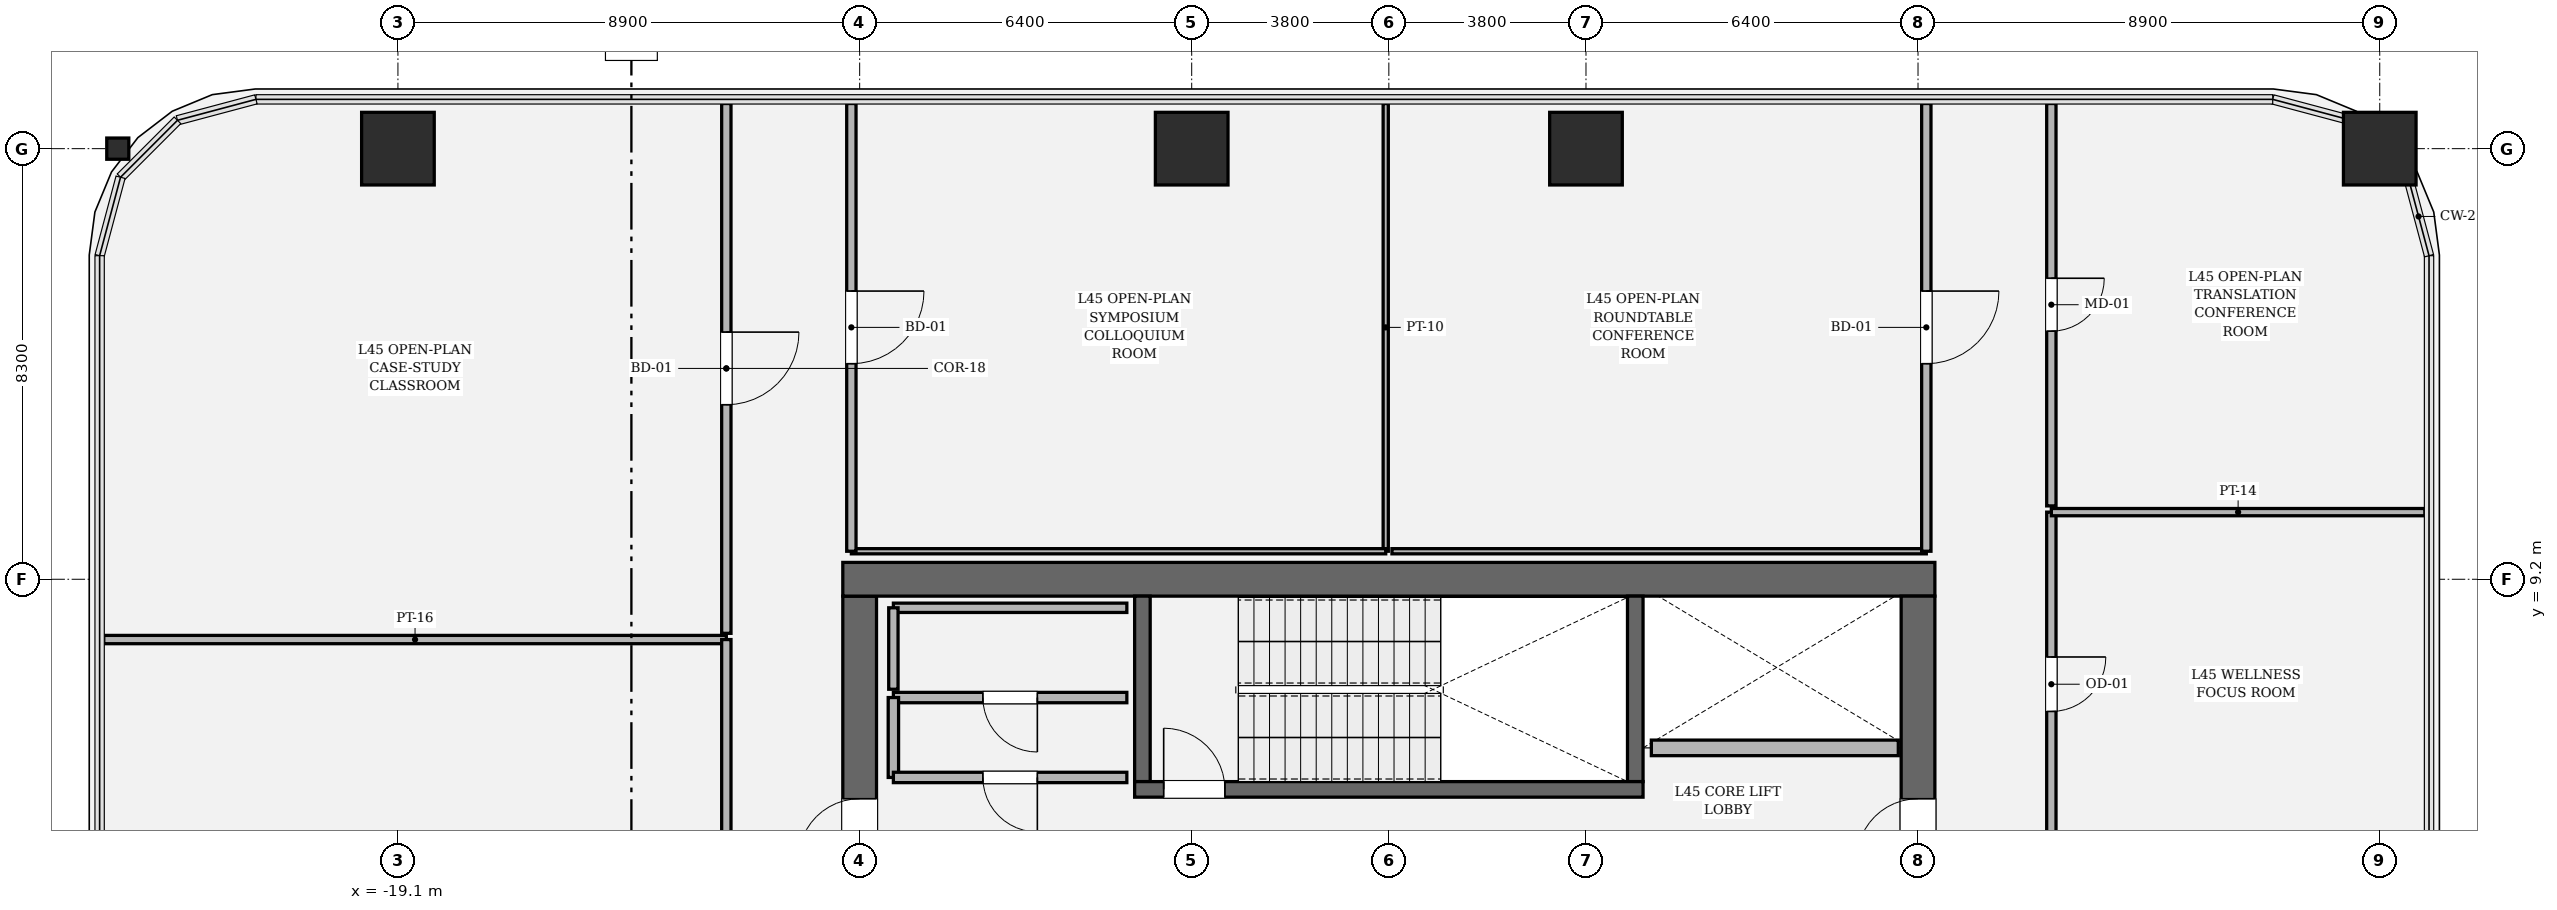
"""IFC4 building model, lengths in metres.
Left out: names, types, materials, properties, quantities, classifications, styles, units other than length and angle.
Written with IfcOpenShell. Run it as: python <this file> out.ifc"""

import sys

from ifc_helpers import new_model, si_unit, direction, frame, frame_2d, origin, origin_2d, place, context, subcontext, project, spatial, rectangle, hollow_rectangle, i_section, extrude, element, fill, save


model = new_model("IFC4")
c1 = context("Model", 3, precision=1e-05, world=origin(), true_north=direction((0.0, 1.0)))
c2 = subcontext(c1, "Body", "Model", "MODEL_VIEW")
j1 = project(units=[si_unit("LENGTHUNIT", "METRE"), si_unit("PLANEANGLEUNIT", "RADIAN")], contexts=[c1])
p1 = place(None, origin())
s1 = spatial("IfcSite", under=j1, at=p1, CompositionType="ELEMENT")
p2 = place(p1, origin())
s2 = spatial("IfcBuilding", under=s1, at=p2, CompositionType="ELEMENT")
p3 = place(p2, frame((0.0, 0.0, 192.45)))
s3 = spatial("IfcBuildingStorey", under=s2, at=p3, CompositionType="ELEMENT", Elevation=192.45)
p4 = place(p3, frame((-10.2, -8.875, 0.0), z_axis=(0.0, 0.0, 1.0), x_axis=(0.0, 1.0, 0.0)))
e1 = element("IfcWall", 1, at=p4, inside=s3, PredefinedType="SHEAR", context=c2, shape_type="SweptSolid", body=[
    extrude(rectangle(XDim=17.75, YDim=0.65, at=frame_2d((8.875, 0.0))), origin(), (0.0, 0.0, 1.0), 4.05),
])
p5 = place(p4, frame((12.665, 0.0, 0.0)))
e2 = element("IfcOpeningElement", 2, at=p5, cuts=e1, PredefinedType="OPENING", context=c2, shape_type="SweptSolid", body=[
    extrude(rectangle(XDim=1.18, YDim=2.2, at=frame_2d((0.59, 1.1))), frame((0.0, 0.335, 0.0), z_axis=(0.0, -1.0, 0.0), x_axis=(1.0, 0.0, 0.0)), (0.0, 0.0, 1.0), 0.67),
])
p6 = place(p3, frame((-10.525, 9.2, 0.0), z_axis=(0.0, 0.0, 1.0), x_axis=(1.0, 0.0, 0.0)))
e3 = element("IfcWall", 3, at=p6, inside=s3, PredefinedType="SHEAR", context=c2, shape_type="SweptSolid", body=[
    extrude(rectangle(XDim=21.05, YDim=0.65, at=frame_2d((10.525, 0.0))), origin(), (0.0, 0.0, 1.0), 4.05),
])
p7 = place(p3, frame((10.2, 8.875, 0.0), z_axis=(0.0, 0.0, 1.0), x_axis=(0.0, -1.0, 0.0)))
e4 = element("IfcWall", 4, at=p7, inside=s3, PredefinedType="SHEAR", context=c2, shape_type="SweptSolid", body=[
    extrude(rectangle(XDim=17.75, YDim=0.65, at=frame_2d((8.875, 0.0))), origin(), (0.0, 0.0, 1.0), 4.05),
])
p8 = place(p7, frame((3.905, 0.0, 0.0)))
e5 = element("IfcOpeningElement", 5, at=p8, cuts=e4, PredefinedType="OPENING", context=c2, shape_type="SweptSolid", body=[
    extrude(rectangle(XDim=1.18, YDim=2.2, at=frame_2d((0.59, 1.1))), frame((0.0, 0.335, 0.0), z_axis=(0.0, -1.0, 0.0), x_axis=(1.0, 0.0, 0.0)), (0.0, 0.0, 1.0), 0.67),
])
for number, where, z_axis, x_axis in (
    (6, (-4.75, 5.3, 0.0), (0.0, 0.0, 1.0), (0.0, 1.0, 0.0)),
    (7, (4.75, 8.875, 0.0), (0.0, 0.0, 1.0), (0.0, -1.0, 0.0)),
):
    element("IfcWall", number, at=place(p3, frame(where, z_axis=z_axis, x_axis=x_axis)), inside=s3, PredefinedType="SOLIDWALL", context=c2, shape_type="SweptSolid", body=[
        extrude(rectangle(XDim=3.575, YDim=0.3, at=frame_2d((1.788, 0.0))), origin(), (0.0, 0.0, 1.0), 4.05),
    ])
p9 = place(p3, frame((-4.9, 5.15, 0.0), z_axis=(0.0, 0.0, 1.0), x_axis=(1.0, 0.0, 0.0)))
e8 = element("IfcWall", 8, at=p9, inside=s3, PredefinedType="SOLIDWALL", context=c2, shape_type="SweptSolid", body=[
    extrude(rectangle(XDim=9.8, YDim=0.3, at=frame_2d((4.9, 0.0))), origin(), (0.0, 0.0, 1.0), 4.05),
])
p10 = place(p9, frame((0.56, 0.0, 0.0)))
e9 = element("IfcOpeningElement", 9, at=p10, cuts=e8, PredefinedType="OPENING", context=c2, shape_type="SweptSolid", body=[
    extrude(rectangle(XDim=1.18, YDim=2.2, at=frame_2d((0.59, 1.1))), frame((0.0, 0.16, 0.0), z_axis=(0.0, -1.0, 0.0), x_axis=(1.0, 0.0, 0.0)), (0.0, 0.0, 1.0), 0.32),
])
for number, where, z_axis, x_axis in (
    (10, (19.1, 17.5, 0.0), (0.0, 0.0, 1.0), (1.0, 0.0, 0.0)),
    (11, (3.8, 17.5, 0.0), (0.0, 0.0, 1.0), (1.0, 0.0, 0.0)),
    (12, (-3.8, 17.5, 0.0), (0.0, 0.0, 1.0), (1.0, 0.0, 0.0)),
    (13, (-19.1, 17.5, 0.0), (0.0, 0.0, 1.0), (1.0, 0.0, 0.0)),
):
    element("IfcColumn", number, at=place(p3, frame(where, z_axis=z_axis, x_axis=x_axis)), inside=s3, PredefinedType="COLUMN", context=c2, shape_type="SweptSolid", body=[
        extrude(hollow_rectangle(XDim=1.4, YDim=1.4, WallThickness=0.042, at=origin_2d()), origin(), (0.0, 0.0, 1.0), 4.05),
    ])
p11 = place(p3, frame((-24.5, 17.5, 0.0), z_axis=(0.0, 0.0, 1.0), x_axis=(0.0, 1.0, 0.0)))
e14 = element("IfcColumn", 14, at=p11, inside=s3, PredefinedType="COLUMN", context=c2, shape_type="SweptSolid", body=[
    extrude(i_section(OverallWidth=0.409, OverallDepth=0.425, WebThickness=0.032, FlangeThickness=0.052, FilletRadius=0.018, at=origin_2d()), origin(), (0.0, 0.0, 1.0), 4.048),
])
p12 = place(p3, frame((5.06, 5.95, 0.0), z_axis=(0.0, 0.0, 1.0), x_axis=(1.0, 0.0, 0.0)))
e15 = element("IfcWall", 15, at=p12, inside=s3, PredefinedType="SOLIDWALL", context=c2, shape_type="SweptSolid", body=[
    extrude(rectangle(XDim=4.76, YDim=0.3, at=frame_2d((2.38, 0.0))), origin(), (0.0, 0.0, 1.0), 3.83),
])
p13 = place(p3, frame((-5.05, 6.92, 0.0), z_axis=(0.0, 0.0, 1.0), x_axis=(-1.0, 0.0, 0.0)))
e16 = element("IfcWall", 16, at=p13, inside=s3, PredefinedType="SOLIDWALL", context=c2, shape_type="SweptSolid", body=[
    extrude(rectangle(XDim=4.5, YDim=0.2, at=frame_2d((2.25, 0.0))), origin(), (0.0, 0.0, 1.0), 3.83),
])
p14 = place(p13, frame((1.725, 0.0, 0.0)))
e17 = element("IfcOpeningElement", 17, at=p14, cuts=e16, PredefinedType="OPENING", context=c2, shape_type="SweptSolid", body=[
    extrude(rectangle(XDim=1.05, YDim=2.2, at=frame_2d((0.525, 1.1))), frame((0.0, 0.11, 0.0), z_axis=(0.0, -1.0, 0.0), x_axis=(1.0, 0.0, 0.0)), (0.0, 0.0, 1.0), 0.22),
])
p15 = place(p3, frame((-9.55, 6.92, 0.0), z_axis=(0.0, 0.0, 1.0), x_axis=(0.0, -1.0, 0.0)))
e18 = element("IfcWall", 18, at=p15, inside=s3, PredefinedType="SOLIDWALL", context=c2, shape_type="SweptSolid", body=[
    extrude(rectangle(XDim=1.54, YDim=0.2, at=frame_2d((0.77, 0.0))), origin(), (0.0, 0.0, 1.0), 3.83),
])
p16 = place(p3, frame((-9.55, 5.38, 0.0), z_axis=(0.0, 0.0, 1.0), x_axis=(1.0, 0.0, 0.0)))
e19 = element("IfcWall", 19, at=p16, inside=s3, PredefinedType="SOLIDWALL", context=c2, shape_type="SweptSolid", body=[
    extrude(rectangle(XDim=4.5, YDim=0.2, at=frame_2d((2.25, 0.0))), origin(), (0.0, 0.0, 1.0), 3.83),
])
p17 = place(p16, frame((1.725, 0.0, 0.0)))
e20 = element("IfcOpeningElement", 20, at=p17, cuts=e19, PredefinedType="OPENING", context=c2, shape_type="SweptSolid", body=[
    extrude(rectangle(XDim=1.05, YDim=2.2, at=frame_2d((0.525, 1.1))), frame((0.0, 0.11, 0.0), z_axis=(0.0, -1.0, 0.0), x_axis=(1.0, 0.0, 0.0)), (0.0, 0.0, 1.0), 0.22),
])
p18 = place(p3, frame((-5.05, 8.65, 0.0), z_axis=(0.0, 0.0, 1.0), x_axis=(-1.0, 0.0, 0.0)))
e21 = element("IfcWall", 21, at=p18, inside=s3, PredefinedType="PARTITIONING", context=c2, shape_type="SweptSolid", body=[
    extrude(rectangle(XDim=4.5, YDim=0.18, at=frame_2d((2.25, 0.0))), origin(), (0.0, 0.0, 1.0), 3.83),
])
p19 = place(p3, frame((-9.55, 8.65, 0.0), z_axis=(0.0, 0.0, 1.0), x_axis=(0.0, -1.0, 0.0)))
e22 = element("IfcWall", 22, at=p19, inside=s3, PredefinedType="PARTITIONING", context=c2, shape_type="SweptSolid", body=[
    extrude(rectangle(XDim=1.57, YDim=0.18, at=frame_2d((0.785, 0.0))), origin(), (0.0, 0.0, 1.0), 3.83),
])
p20 = place(p3, frame((-24.77, 8.038, 0.0), z_axis=(0.0, 0.0, 1.0), x_axis=(1.0, 0.0, 0.0)))
e23 = element("IfcWall", 23, at=p20, inside=s3, PredefinedType="PARTITIONING", context=c2, shape_type="SweptSolid", body=[
    extrude(rectangle(XDim=12.0, YDim=0.16, at=frame_2d((6.0, 0.0))), origin(), (0.0, 0.0, 1.0), 2.544),
])
p21 = place(p3, frame((-12.77, 8.038, 0.0), z_axis=(0.0, 0.0, 1.0), x_axis=(0.0, -1.0, 0.0)))
e24 = element("IfcWall", 24, at=p21, inside=s3, PredefinedType="PARTITIONING", context=c2, shape_type="SweptSolid", body=[
    extrude(rectangle(XDim=19.528, YDim=0.18, at=frame_2d((9.764, 0.0))), origin(), (0.0, 0.0, 1.0), 3.174),
])
p22 = place(p21, frame((9.239, 0.0, 0.0)))
e25 = element("IfcOpeningElement", 25, at=p22, cuts=e24, PredefinedType="OPENING", context=c2, shape_type="SweptSolid", body=[
    extrude(rectangle(XDim=1.05, YDim=2.2, at=frame_2d((0.525, 1.1))), frame((0.0, 0.1, 0.0), z_axis=(0.0, -1.0, 0.0), x_axis=(1.0, 0.0, 0.0)), (0.0, 0.0, 1.0), 0.2),
])
p23 = place(p3, frame((12.77, 3.86, 0.0), z_axis=(0.0, 0.0, 1.0), x_axis=(0.0, 1.0, 0.0)))
e26 = element("IfcWall", 26, at=p23, inside=s3, PredefinedType="PARTITIONING", context=c2, shape_type="SweptSolid", body=[
    extrude(rectangle(XDim=6.634, YDim=0.18, at=frame_2d((3.317, 0.0))), origin(), (0.0, 0.0, 1.0), 3.174),
])
p24 = place(p23, frame((2.792, 0.0, 0.0)))
e27 = element("IfcOpeningElement", 27, at=p24, cuts=e26, PredefinedType="OPENING", context=c2, shape_type="SweptSolid", body=[
    extrude(rectangle(XDim=1.05, YDim=2.2, at=frame_2d((0.525, 1.1))), frame((0.0, 0.1, 0.0), z_axis=(0.0, -1.0, 0.0), x_axis=(1.0, 0.0, 0.0)), (0.0, 0.0, 1.0), 0.2),
])
p25 = place(p3, frame((12.77, 10.494, 0.0), z_axis=(0.0, 0.0, 1.0), x_axis=(1.0, 0.0, 0.0)))
e28 = element("IfcWall", 28, at=p25, inside=s3, PredefinedType="PARTITIONING", context=c2, shape_type="SweptSolid", body=[
    extrude(rectangle(XDim=7.2, YDim=0.14, at=frame_2d((3.6, 0.0))), origin(), (0.0, 0.0, 1.0), 3.174),
])
p26 = place(p3, frame((-12.77, 18.37, 0.0), z_axis=(0.0, 0.0, 1.0), x_axis=(0.0, -1.0, 0.0)))
e29 = element("IfcWall", 29, at=p26, inside=s3, PredefinedType="PARTITIONING", context=c2, shape_type="SweptSolid", body=[
    extrude(rectangle(XDim=10.212, YDim=0.18, at=frame_2d((5.106, 0.0))), origin(), (0.0, 0.0, 1.0), 3.174),
])
p27 = place(p26, frame((4.406, 0.0, 0.0)))
e30 = element("IfcOpeningElement", 30, at=p27, cuts=e29, PredefinedType="OPENING", context=c2, shape_type="SweptSolid", body=[
    extrude(rectangle(XDim=1.4, YDim=2.25, at=frame_2d((0.7, 1.125))), frame((0.0, 0.1, 0.0), z_axis=(0.0, -1.0, 0.0), x_axis=(1.0, 0.0, 0.0)), (0.0, 0.0, 1.0), 0.2),
])
p28 = place(p3, frame((-0.06, 18.37, 0.0), z_axis=(0.0, 0.0, 1.0), x_axis=(0.0, -1.0, 0.0)))
e31 = element("IfcWall", 31, at=p28, inside=s3, PredefinedType="PARTITIONING", context=c2, shape_type="SweptSolid", body=[
    extrude(rectangle(XDim=8.63, YDim=0.1, at=frame_2d((4.315, 0.0))), origin(), (0.0, 0.0, 1.0), 3.174),
])
p29 = place(p3, frame((-0.06, 9.74, 0.0), z_axis=(0.0, 0.0, 1.0), x_axis=(-1.0, 0.0, 0.0)))
e32 = element("IfcWall", 32, at=p29, inside=s3, PredefinedType="PARTITIONING", context=c2, shape_type="SweptSolid", body=[
    extrude(rectangle(XDim=10.3, YDim=0.1, at=frame_2d((5.15, 0.0))), origin(), (0.0, 0.0, 1.0), 3.174),
])
p30 = place(p3, frame((-10.36, 9.74, 0.0), z_axis=(0.0, 0.0, 1.0), x_axis=(0.0, 1.0, 0.0)))
e33 = element("IfcWall", 33, at=p30, inside=s3, PredefinedType="PARTITIONING", context=c2, shape_type="SweptSolid", body=[
    extrude(rectangle(XDim=8.63, YDim=0.18, at=frame_2d((4.315, 0.0))), origin(), (0.0, 0.0, 1.0), 3.174),
])
p31 = place(p30, frame((3.615, 0.0, 0.0)))
e34 = element("IfcOpeningElement", 34, at=p31, cuts=e33, PredefinedType="OPENING", context=c2, shape_type="SweptSolid", body=[
    extrude(rectangle(XDim=1.4, YDim=2.25, at=frame_2d((0.7, 1.125))), frame((0.0, 0.1, 0.0), z_axis=(0.0, -1.0, 0.0), x_axis=(1.0, 0.0, 0.0)), (0.0, 0.0, 1.0), 0.2),
])
p32 = place(p3, frame((10.36, 9.74, 0.0), z_axis=(0.0, 0.0, 1.0), x_axis=(-1.0, 0.0, 0.0)))
e35 = element("IfcWall", 35, at=p32, inside=s3, PredefinedType="PARTITIONING", context=c2, shape_type="SweptSolid", body=[
    extrude(rectangle(XDim=10.3, YDim=0.1, at=frame_2d((5.15, 0.0))), origin(), (0.0, 0.0, 1.0), 3.174),
])
p33 = place(p3, frame((10.36, 18.37, 0.0), z_axis=(0.0, 0.0, 1.0), x_axis=(0.0, -1.0, 0.0)))
e36 = element("IfcWall", 36, at=p33, inside=s3, PredefinedType="PARTITIONING", context=c2, shape_type="SweptSolid", body=[
    extrude(rectangle(XDim=8.63, YDim=0.18, at=frame_2d((4.315, 0.0))), origin(), (0.0, 0.0, 1.0), 3.174),
])
p34 = place(p33, frame((3.615, 0.0, 0.0)))
e37 = element("IfcOpeningElement", 37, at=p34, cuts=e36, PredefinedType="OPENING", context=c2, shape_type="SweptSolid", body=[
    extrude(rectangle(XDim=1.4, YDim=2.25, at=frame_2d((0.7, 1.125))), frame((0.0, 0.1, 0.0), z_axis=(0.0, -1.0, 0.0), x_axis=(1.0, 0.0, 0.0)), (0.0, 0.0, 1.0), 0.2),
])
p35 = place(p3, frame((12.77, 10.614, 0.0), z_axis=(0.0, 0.0, 1.0), x_axis=(0.0, 1.0, 0.0)))
e38 = element("IfcWall", 38, at=p35, inside=s3, PredefinedType="PARTITIONING", context=c2, shape_type="SweptSolid", body=[
    extrude(rectangle(XDim=7.756, YDim=0.18, at=frame_2d((3.878, 0.0))), origin(), (0.0, 0.0, 1.0), 3.174),
])
p36 = place(p35, frame((3.368, 0.0, 0.0)))
e39 = element("IfcOpeningElement", 39, at=p36, cuts=e38, PredefinedType="OPENING", context=c2, shape_type="SweptSolid", body=[
    extrude(rectangle(XDim=1.02, YDim=2.2, at=frame_2d((0.51, 1.1))), frame((0.0, 0.1, 0.0), z_axis=(0.0, -1.0, 0.0), x_axis=(1.0, 0.0, 0.0)), (0.0, 0.0, 1.0), 0.2),
])
p37 = place(p10, origin())
e40 = element("IfcDoor", 40, at=p37, inside=s3, OperationType="SINGLE_SWING_LEFT", PredefinedType="DOOR", context=c2, shape_type="SweptSolid", body=[
    extrude(rectangle(XDim=1.18, YDim=2.2, at=frame_2d((0.59, 1.1))), frame((0.0, 0.025, 0.0), z_axis=(0.0, -1.0, 0.0), x_axis=(1.0, 0.0, 0.0)), (0.0, 0.0, 1.0), 0.05),
])
fill(e9, e40)
p38 = place(p5, origin())
e41 = element("IfcDoor", 41, at=p38, inside=s3, OperationType="SINGLE_SWING_LEFT", PredefinedType="DOOR", context=c2, shape_type="SweptSolid", body=[
    extrude(rectangle(XDim=1.18, YDim=2.2, at=frame_2d((0.59, 1.1))), frame((0.0, 0.025, 0.0), z_axis=(0.0, -1.0, 0.0), x_axis=(1.0, 0.0, 0.0)), (0.0, 0.0, 1.0), 0.05),
])
fill(e2, e41)
p39 = place(p8, origin())
e42 = element("IfcDoor", 42, at=p39, inside=s3, OperationType="SINGLE_SWING_RIGHT", PredefinedType="DOOR", context=c2, shape_type="SweptSolid", body=[
    extrude(rectangle(XDim=1.18, YDim=2.2, at=frame_2d((0.59, 1.1))), frame((0.0, 0.025, 0.0), z_axis=(0.0, -1.0, 0.0), x_axis=(1.0, 0.0, 0.0)), (0.0, 0.0, 1.0), 0.05),
])
fill(e5, e42)
p40 = place(p17, origin())
e43 = element("IfcDoor", 43, at=p40, inside=s3, OperationType="SINGLE_SWING_RIGHT", PredefinedType="DOOR", context=c2, shape_type="SweptSolid", body=[
    extrude(rectangle(XDim=1.05, YDim=2.2, at=frame_2d((0.525, 1.1))), frame((0.0, 0.025, 0.0), z_axis=(0.0, -1.0, 0.0), x_axis=(1.0, 0.0, 0.0)), (0.0, 0.0, 1.0), 0.05),
])
fill(e20, e43)
p41 = place(p14, origin())
e44 = element("IfcDoor", 44, at=p41, inside=s3, OperationType="SINGLE_SWING_LEFT", PredefinedType="DOOR", context=c2, shape_type="SweptSolid", body=[
    extrude(rectangle(XDim=1.05, YDim=2.2, at=frame_2d((0.525, 1.1))), frame((0.0, 0.025, 0.0), z_axis=(0.0, -1.0, 0.0), x_axis=(1.0, 0.0, 0.0)), (0.0, 0.0, 1.0), 0.05),
])
fill(e17, e44)
p42 = place(p24, origin())
e45 = element("IfcDoor", 45, at=p42, inside=s3, OperationType="SINGLE_SWING_RIGHT", PredefinedType="DOOR", context=c2, shape_type="SweptSolid", body=[
    extrude(rectangle(XDim=1.05, YDim=2.2, at=frame_2d((0.525, 1.1))), frame((0.0, 0.025, 0.0), z_axis=(0.0, -1.0, 0.0), x_axis=(1.0, 0.0, 0.0)), (0.0, 0.0, 1.0), 0.05),
])
fill(e27, e45)
p43 = place(p27, origin())
e46 = element("IfcDoor", 46, at=p43, inside=s3, OperationType="SINGLE_SWING_LEFT", PredefinedType="DOOR", context=c2, shape_type="SweptSolid", body=[
    extrude(rectangle(XDim=1.4, YDim=2.25, at=frame_2d((0.7, 1.125))), frame((0.0, 0.025, 0.0), z_axis=(0.0, -1.0, 0.0), x_axis=(1.0, 0.0, 0.0)), (0.0, 0.0, 1.0), 0.05),
])
fill(e30, e46)
p44 = place(p31, origin())
e47 = element("IfcDoor", 47, at=p44, inside=s3, OperationType="SINGLE_SWING_RIGHT", PredefinedType="DOOR", context=c2, shape_type="SweptSolid", body=[
    extrude(rectangle(XDim=1.4, YDim=2.25, at=frame_2d((0.7, 1.125))), frame((0.0, 0.025, 0.0), z_axis=(0.0, -1.0, 0.0), x_axis=(1.0, 0.0, 0.0)), (0.0, 0.0, 1.0), 0.05),
])
fill(e34, e47)
p45 = place(p34, origin())
e48 = element("IfcDoor", 48, at=p45, inside=s3, OperationType="SINGLE_SWING_LEFT", PredefinedType="DOOR", context=c2, shape_type="SweptSolid", body=[
    extrude(rectangle(XDim=1.4, YDim=2.25, at=frame_2d((0.7, 1.125))), frame((0.0, 0.025, 0.0), z_axis=(0.0, -1.0, 0.0), x_axis=(1.0, 0.0, 0.0)), (0.0, 0.0, 1.0), 0.05),
])
fill(e37, e48)
p46 = place(p36, origin())
e49 = element("IfcDoor", 49, at=p46, inside=s3, OperationType="SINGLE_SWING_RIGHT", PredefinedType="DOOR", context=c2, shape_type="SweptSolid", body=[
    extrude(rectangle(XDim=1.02, YDim=2.2, at=frame_2d((0.51, 1.1))), frame((0.0, 0.025, 0.0), z_axis=(0.0, -1.0, 0.0), x_axis=(1.0, 0.0, 0.0)), (0.0, 0.0, 1.0), 0.05),
])
fill(e39, e49)
save(model, sys.argv[1])
